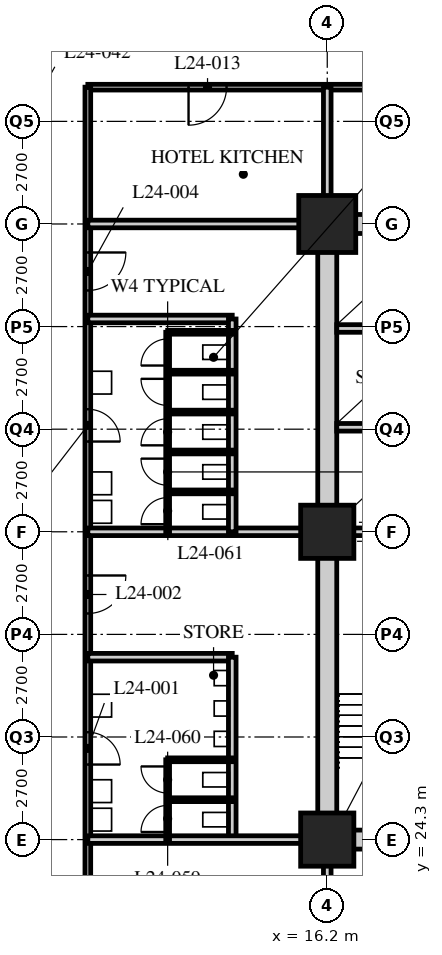
"""IFC4 building model, lengths in metres.
Left out: names, types, materials, properties, quantities, classifications, styles, units other than length and angle.
Written with IfcOpenShell. Run it as: python <this file> out.ifc"""

import sys

from ifc_helpers import new_model, si_unit, direction, frame, frame_2d, origin, origin_2d, place, context, subcontext, project, spatial, rectangle, hollow_rectangle, extrude, element, fill, save


model = new_model("IFC4")
c1 = context("Model", 3, precision=1e-05, world=origin(), true_north=direction((0.0, 1.0)))
c2 = subcontext(c1, "Body", "Model", "MODEL_VIEW")
j1 = project(units=[si_unit("LENGTHUNIT", "METRE"), si_unit("PLANEANGLEUNIT", "RADIAN")], contexts=[c1])
p1 = place(None, origin())
s1 = spatial("IfcSite", under=j1, at=p1, CompositionType="ELEMENT")
p2 = place(p1, origin())
s2 = spatial("IfcBuilding", under=s1, at=p2, CompositionType="ELEMENT")
p3 = place(p2, frame((0.0, 0.0, 98.0)))
s3 = spatial("IfcBuildingStorey", under=s2, at=p3, CompositionType="ELEMENT", Elevation=98.0)
for number, where, z_axis, x_axis in (
    (1, (16.2, 24.3, 0.0), (0.0, 0.0, 1.0), (1.0, 0.0, 0.0)),
    (2, (16.2, 32.4, 0.0), (0.0, 0.0, 1.0), (1.0, 0.0, 0.0)),
):
    element("IfcColumn", number, at=place(p3, frame(where, z_axis=z_axis, x_axis=x_axis)), inside=s3, PredefinedType="COLUMN", context=c2, shape_type="SweptSolid", body=[
        extrude(hollow_rectangle(XDim=1.4, YDim=1.4, WallThickness=0.12, at=origin_2d()), origin(), (0.0, 0.0, 1.0), 5.4),
    ])
p4 = place(p3, frame((16.2, 40.5, 0.0), z_axis=(0.0, 0.0, 1.0), x_axis=(1.0, 0.0, 0.0)))
e3 = element("IfcColumn", 3, at=p4, inside=s3, PredefinedType="COLUMN", context=c2, shape_type="SweptSolid", body=[
    extrude(hollow_rectangle(XDim=1.5, YDim=1.5, WallThickness=0.13, at=origin_2d()), origin(), (0.0, 0.0, 1.0), 5.4),
])
p5 = place(p3, frame((27.14, 44.1, 0.0), z_axis=(0.0, 0.0, 1.0), x_axis=(-1.0, 0.0, 0.0)))
e4 = element("IfcWall", 4, at=p5, inside=s3, PredefinedType="PARTITIONING", context=c2, shape_type="SweptSolid", body=[
    extrude(rectangle(XDim=17.24, YDim=0.15, at=frame_2d((8.62, 0.0))), origin(), (0.0, 0.0, 1.0), 5.19),
])
p6 = place(p5, frame((13.59, 0.0, 0.0)))
e5 = element("IfcOpeningElement", 5, at=p6, cuts=e4, PredefinedType="OPENING", context=c2, shape_type="SweptSolid", body=[
    extrude(rectangle(XDim=1.0, YDim=2.1, at=frame_2d((0.5, 1.05))), frame((0.0, 0.085, 0.0), z_axis=(0.0, -1.0, 0.0), x_axis=(1.0, 0.0, 0.0)), (0.0, 0.0, 1.0), 0.17),
])
p7 = place(p5, frame((4.965, 0.0, 0.0)))
e6 = element("IfcOpeningElement", 6, at=p7, cuts=e4, PredefinedType="OPENING", context=c2, shape_type="SweptSolid", body=[
    extrude(rectangle(XDim=1.0, YDim=2.1, at=frame_2d((0.5, 1.05))), frame((0.0, 0.085, 0.0), z_axis=(0.0, -1.0, 0.0), x_axis=(1.0, 0.0, 0.0)), (0.0, 0.0, 1.0), 0.17),
])
p8 = place(p3, frame((9.9, 44.1, 0.0), z_axis=(0.0, 0.0, 1.0), x_axis=(0.0, -1.0, 0.0)))
e7 = element("IfcWall", 7, at=p8, inside=s3, PredefinedType="PARTITIONING", context=c2, shape_type="SweptSolid", body=[
    extrude(rectangle(XDim=28.8, YDim=0.15, at=frame_2d((14.4, 0.0))), origin(), (0.0, 0.0, 1.0), 5.19),
])
p9 = place(p8, frame((16.975, 0.0, 0.0)))
e8 = element("IfcOpeningElement", 8, at=p9, cuts=e7, PredefinedType="OPENING", context=c2, shape_type="SweptSolid", body=[
    extrude(rectangle(XDim=0.85, YDim=2.1, at=frame_2d((0.425, 1.05))), frame((0.0, 0.085, 0.0), z_axis=(0.0, -1.0, 0.0), x_axis=(1.0, 0.0, 0.0)), (0.0, 0.0, 1.0), 0.17),
])
p10 = place(p8, frame((12.85, 0.0, 0.0)))
e9 = element("IfcOpeningElement", 9, at=p10, cuts=e7, PredefinedType="OPENING", context=c2, shape_type="SweptSolid", body=[
    extrude(rectangle(XDim=1.0, YDim=2.1, at=frame_2d((0.5, 1.05))), frame((0.0, 0.085, 0.0), z_axis=(0.0, -1.0, 0.0), x_axis=(1.0, 0.0, 0.0)), (0.0, 0.0, 1.0), 0.17),
])
p11 = place(p8, frame((8.475, 0.0, 0.0)))
e10 = element("IfcOpeningElement", 10, at=p11, cuts=e7, PredefinedType="OPENING", context=c2, shape_type="SweptSolid", body=[
    extrude(rectangle(XDim=0.85, YDim=2.1, at=frame_2d((0.425, 1.05))), frame((0.0, 0.085, 0.0), z_axis=(0.0, -1.0, 0.0), x_axis=(1.0, 0.0, 0.0)), (0.0, 0.0, 1.0), 0.17),
])
p12 = place(p8, frame((4.35, 0.0, 0.0)))
e11 = element("IfcOpeningElement", 11, at=p12, cuts=e7, PredefinedType="OPENING", context=c2, shape_type="SweptSolid", body=[
    extrude(rectangle(XDim=1.0, YDim=2.1, at=frame_2d((0.5, 1.05))), frame((0.0, 0.085, 0.0), z_axis=(0.0, -1.0, 0.0), x_axis=(1.0, 0.0, 0.0)), (0.0, 0.0, 1.0), 0.17),
])
p13 = place(p3, frame((9.9, 32.4, 0.0), z_axis=(0.0, 0.0, 1.0), x_axis=(1.0, 0.0, 0.0)))
e12 = element("IfcWall", 12, at=p13, inside=s3, PredefinedType="SOLIDWALL", context=c2, shape_type="SweptSolid", body=[
    extrude(rectangle(XDim=6.3, YDim=0.2, at=frame_2d((3.15, 0.0))), origin(), (0.0, 0.0, 1.0), 5.19),
])
p14 = place(p3, frame((9.9, 29.1, 0.0), z_axis=(0.0, 0.0, 1.0), x_axis=(1.0, 0.0, 0.0)))
e13 = element("IfcWall", 13, at=p14, inside=s3, PredefinedType="SOLIDWALL", context=c2, shape_type="SweptSolid", body=[
    extrude(rectangle(XDim=3.8, YDim=0.2, at=frame_2d((1.9, 0.0))), origin(), (0.0, 0.0, 1.0), 5.19),
])
p15 = place(p3, frame((13.7, 24.3, 0.0), z_axis=(0.0, 0.0, 1.0), x_axis=(0.0, 1.0, 0.0)))
e14 = element("IfcWall", 14, at=p15, inside=s3, PredefinedType="SOLIDWALL", context=c2, shape_type="SweptSolid", body=[
    extrude(rectangle(XDim=4.8, YDim=0.2, at=frame_2d((2.4, 0.0))), origin(), (0.0, 0.0, 1.0), 5.19),
])
p16 = place(p3, frame((9.9, 38.0, 0.0), z_axis=(0.0, 0.0, 1.0), x_axis=(1.0, 0.0, 0.0)))
e15 = element("IfcWall", 15, at=p16, inside=s3, PredefinedType="SOLIDWALL", context=c2, shape_type="SweptSolid", body=[
    extrude(rectangle(XDim=3.8, YDim=0.2, at=frame_2d((1.9, 0.0))), origin(), (0.0, 0.0, 1.0), 4.49),
])
p17 = place(p3, frame((13.7, 32.4, 0.0), z_axis=(0.0, 0.0, 1.0), x_axis=(0.0, 1.0, 0.0)))
e16 = element("IfcWall", 16, at=p17, inside=s3, PredefinedType="SOLIDWALL", context=c2, shape_type="SweptSolid", body=[
    extrude(rectangle(XDim=5.6, YDim=0.2, at=frame_2d((2.8, 0.0))), origin(), (0.0, 0.0, 1.0), 5.19),
])
p18 = place(p3, frame((16.2, 15.3, 0.0), z_axis=(0.0, 0.0, 1.0), x_axis=(0.0, 1.0, 0.0)))
e17 = element("IfcWall", 17, at=p18, inside=s3, PredefinedType="SOLIDWALL", context=c2, shape_type="SweptSolid", body=[
    extrude(rectangle(XDim=9.0, YDim=0.2, at=frame_2d((4.5, 0.0))), origin(), (0.0, 0.0, 1.0), 4.49),
])
p19 = place(p3, frame((16.2, 40.5, 0.0), z_axis=(0.0, 0.0, 1.0), x_axis=(0.0, 1.0, 0.0)))
e18 = element("IfcWall", 18, at=p19, inside=s3, PredefinedType="SOLIDWALL", context=c2, shape_type="SweptSolid", body=[
    extrude(rectangle(XDim=3.6, YDim=0.2, at=frame_2d((1.8, 0.0))), origin(), (0.0, 0.0, 1.0), 4.49),
])
for number, where, z_axis, x_axis in (
    (19, (9.9, 24.3, 0.0), (0.0, 0.0, 1.0), (1.0, 0.0, 0.0)),
    (20, (9.9, 40.5, 0.0), (0.0, 0.0, 1.0), (1.0, 0.0, 0.0)),
):
    element("IfcWall", number, at=place(p3, frame(where, z_axis=z_axis, x_axis=x_axis)), inside=s3, PredefinedType="SOLIDWALL", context=c2, shape_type="SweptSolid", body=[
        extrude(rectangle(XDim=6.3, YDim=0.2, at=frame_2d((3.15, 0.0))), origin(), (0.0, 0.0, 1.0), 5.19),
    ])
p20 = place(p3, frame((12.0, 24.3, 0.0), z_axis=(0.0, 0.0, 1.0), x_axis=(0.0, 1.0, 0.0)))
e21 = element("IfcWall", 21, at=p20, inside=s3, PredefinedType="PARTITIONING", context=c2, shape_type="SweptSolid", body=[
    extrude(rectangle(XDim=2.1, YDim=0.1, at=frame_2d((1.05, 0.0))), origin(), (0.0, 0.0, 1.0), 5.19),
])
p21 = place(p20, frame((0.2, 0.0, 0.0)))
e22 = element("IfcOpeningElement", 22, at=p21, cuts=e21, PredefinedType="OPENING", context=c2, shape_type="SweptSolid", body=[
    extrude(rectangle(XDim=0.7, YDim=2.0, at=frame_2d((0.35, 1.0))), frame((0.0, 0.06, 0.0), z_axis=(0.0, -1.0, 0.0), x_axis=(1.0, 0.0, 0.0)), (0.0, 0.0, 1.0), 0.12),
])
p22 = place(p20, frame((1.225, 0.0, 0.0)))
e23 = element("IfcOpeningElement", 23, at=p22, cuts=e21, PredefinedType="OPENING", context=c2, shape_type="SweptSolid", body=[
    extrude(rectangle(XDim=0.7, YDim=2.0, at=frame_2d((0.35, 1.0))), frame((0.0, 0.06, 0.0), z_axis=(0.0, -1.0, 0.0), x_axis=(1.0, 0.0, 0.0)), (0.0, 0.0, 1.0), 0.12),
])
for number, where, z_axis, x_axis in (
    (24, (12.0, 25.35, 0.0), (0.0, 0.0, 1.0), (1.0, 0.0, 0.0)),
    (25, (12.0, 26.4, 0.0), (0.0, 0.0, 1.0), (1.0, 0.0, 0.0)),
):
    element("IfcWall", number, at=place(p3, frame(where, z_axis=z_axis, x_axis=x_axis)), inside=s3, PredefinedType="PARTITIONING", context=c2, shape_type="SweptSolid", body=[
        extrude(rectangle(XDim=1.7, YDim=0.1, at=frame_2d((0.85, 0.0))), origin(), (0.0, 0.0, 1.0), 5.19),
    ])
p23 = place(p3, frame((12.0, 32.4, 0.0), z_axis=(0.0, 0.0, 1.0), x_axis=(0.0, 1.0, 0.0)))
e26 = element("IfcWall", 26, at=p23, inside=s3, PredefinedType="PARTITIONING", context=c2, shape_type="SweptSolid", body=[
    extrude(rectangle(XDim=5.25, YDim=0.1, at=frame_2d((2.625, 0.0))), origin(), (0.0, 0.0, 1.0), 5.19),
])
p24 = place(p23, frame((0.2, 0.0, 0.0)))
e27 = element("IfcOpeningElement", 27, at=p24, cuts=e26, PredefinedType="OPENING", context=c2, shape_type="SweptSolid", body=[
    extrude(rectangle(XDim=0.7, YDim=2.0, at=frame_2d((0.35, 1.0))), frame((0.0, 0.06, 0.0), z_axis=(0.0, -1.0, 0.0), x_axis=(1.0, 0.0, 0.0)), (0.0, 0.0, 1.0), 0.12),
])
p25 = place(p23, frame((1.225, 0.0, 0.0)))
e28 = element("IfcOpeningElement", 28, at=p25, cuts=e26, PredefinedType="OPENING", context=c2, shape_type="SweptSolid", body=[
    extrude(rectangle(XDim=0.7, YDim=2.0, at=frame_2d((0.35, 1.0))), frame((0.0, 0.06, 0.0), z_axis=(0.0, -1.0, 0.0), x_axis=(1.0, 0.0, 0.0)), (0.0, 0.0, 1.0), 0.12),
])
p26 = place(p23, frame((2.275, 0.0, 0.0)))
e29 = element("IfcOpeningElement", 29, at=p26, cuts=e26, PredefinedType="OPENING", context=c2, shape_type="SweptSolid", body=[
    extrude(rectangle(XDim=0.7, YDim=2.0, at=frame_2d((0.35, 1.0))), frame((0.0, 0.06, 0.0), z_axis=(0.0, -1.0, 0.0), x_axis=(1.0, 0.0, 0.0)), (0.0, 0.0, 1.0), 0.12),
])
p27 = place(p23, frame((3.325, 0.0, 0.0)))
e30 = element("IfcOpeningElement", 30, at=p27, cuts=e26, PredefinedType="OPENING", context=c2, shape_type="SweptSolid", body=[
    extrude(rectangle(XDim=0.7, YDim=2.0, at=frame_2d((0.35, 1.0))), frame((0.0, 0.06, 0.0), z_axis=(0.0, -1.0, 0.0), x_axis=(1.0, 0.0, 0.0)), (0.0, 0.0, 1.0), 0.12),
])
p28 = place(p23, frame((4.375, 0.0, 0.0)))
e31 = element("IfcOpeningElement", 31, at=p28, cuts=e26, PredefinedType="OPENING", context=c2, shape_type="SweptSolid", body=[
    extrude(rectangle(XDim=0.7, YDim=2.0, at=frame_2d((0.35, 1.0))), frame((0.0, 0.06, 0.0), z_axis=(0.0, -1.0, 0.0), x_axis=(1.0, 0.0, 0.0)), (0.0, 0.0, 1.0), 0.12),
])
for number, where, z_axis, x_axis in (
    (32, (12.0, 33.45, 0.0), (0.0, 0.0, 1.0), (1.0, 0.0, 0.0)),
    (33, (12.0, 34.5, 0.0), (0.0, 0.0, 1.0), (1.0, 0.0, 0.0)),
    (34, (12.0, 35.55, 0.0), (0.0, 0.0, 1.0), (1.0, 0.0, 0.0)),
    (35, (12.0, 36.6, 0.0), (0.0, 0.0, 1.0), (1.0, 0.0, 0.0)),
):
    element("IfcWall", number, at=place(p3, frame(where, z_axis=z_axis, x_axis=x_axis)), inside=s3, PredefinedType="PARTITIONING", context=c2, shape_type="SweptSolid", body=[
        extrude(rectangle(XDim=1.7, YDim=0.1, at=frame_2d((0.85, 0.0))), origin(), (0.0, 0.0, 1.0), 5.19),
    ])
p29 = place(p3, frame((12.0, 37.65, 0.0), z_axis=(0.0, 0.0, 1.0), x_axis=(1.0, 0.0, 0.0)))
e36 = element("IfcWall", 36, at=p29, inside=s3, PredefinedType="PARTITIONING", context=c2, shape_type="SweptSolid", body=[
    extrude(rectangle(XDim=1.7, YDim=0.1, at=frame_2d((0.85, 0.0))), origin(), (0.0, 0.0, 1.0), 4.49),
])
p30 = place(p3, frame((15.95, 24.3, 0.0), z_axis=(0.0, 0.0, 1.0), x_axis=(1.0, 0.0, 0.0)))
e37 = element("IfcWall", 37, at=p30, inside=s3, PredefinedType="SOLIDWALL", context=c2, shape_type="SweptSolid", body=[
    extrude(rectangle(XDim=24.8, YDim=0.5, at=frame_2d((12.4, 0.0))), origin(), (0.0, 0.0, 1.0), 4.49),
])
p31 = place(p30, frame((11.5, 0.0, 0.0)))
e38 = element("IfcOpeningElement", 38, at=p31, cuts=e37, PredefinedType="OPENING", context=c2, shape_type="SweptSolid", body=[
    extrude(rectangle(XDim=1.8, YDim=2.4, at=frame_2d((0.9, 1.2))), frame((0.0, 0.26, 0.0), z_axis=(0.0, -1.0, 0.0), x_axis=(1.0, 0.0, 0.0)), (0.0, 0.0, 1.0), 0.52),
])
p32 = place(p3, frame((15.95, 40.5, 0.0), z_axis=(0.0, 0.0, 1.0), x_axis=(1.0, 0.0, 0.0)))
e39 = element("IfcWall", 39, at=p32, inside=s3, PredefinedType="SOLIDWALL", context=c2, shape_type="SweptSolid", body=[
    extrude(rectangle(XDim=24.8, YDim=0.5, at=frame_2d((12.4, 0.0))), origin(), (0.0, 0.0, 1.0), 4.49),
])
p33 = place(p32, frame((11.5, 0.0, 0.0)))
e40 = element("IfcOpeningElement", 40, at=p33, cuts=e39, PredefinedType="OPENING", context=c2, shape_type="SweptSolid", body=[
    extrude(rectangle(XDim=1.8, YDim=2.4, at=frame_2d((0.9, 1.2))), frame((0.0, 0.26, 0.0), z_axis=(0.0, -1.0, 0.0), x_axis=(1.0, 0.0, 0.0)), (0.0, 0.0, 1.0), 0.52),
])
p34 = place(p3, frame((16.2, 24.55, 0.0), z_axis=(0.0, 0.0, 1.0), x_axis=(0.0, 1.0, 0.0)))
e41 = element("IfcWall", 41, at=p34, inside=s3, PredefinedType="SOLIDWALL", context=c2, shape_type="SweptSolid", body=[
    extrude(rectangle(XDim=15.7, YDim=0.5, at=frame_2d((7.85, 0.0))), origin(), (0.0, 0.0, 1.0), 4.49),
])
p35 = place(p3, frame((16.45, 32.4, 0.0), z_axis=(0.0, 0.0, 1.0), x_axis=(1.0, 0.0, 0.0)))
e42 = element("IfcWall", 42, at=p35, inside=s3, PredefinedType="SOLIDWALL", context=c2, shape_type="SweptSolid", body=[
    extrude(rectangle(XDim=7.95, YDim=0.2, at=frame_2d((3.975, 0.0))), origin(), (0.0, 0.0, 1.0), 4.578),
])
for number, where, z_axis, x_axis in (
    (43, (16.45, 35.15, 0.0), (0.0, 0.0, 1.0), (1.0, 0.0, 0.0)),
    (44, (16.45, 37.75, 0.0), (0.0, 0.0, 1.0), (1.0, 0.0, 0.0)),
):
    element("IfcWall", number, at=place(p3, frame(where, z_axis=z_axis, x_axis=x_axis)), inside=s3, PredefinedType="SOLIDWALL", context=c2, shape_type="SweptSolid", body=[
        extrude(rectangle(XDim=2.6, YDim=0.2, at=frame_2d((1.3, 0.0))), origin(), (0.0, 0.0, 1.0), 5.19),
    ])
p36 = place(p9, origin())
e45 = element("IfcDoor", 45, at=p36, inside=s3, OperationType="SINGLE_SWING_RIGHT", PredefinedType="DOOR", context=c2, shape_type="SweptSolid", body=[
    extrude(rectangle(XDim=0.85, YDim=2.1, at=frame_2d((0.425, 1.05))), frame((0.0, 0.025, 0.0), z_axis=(0.0, -1.0, 0.0), x_axis=(1.0, 0.0, 0.0)), (0.0, 0.0, 1.0), 0.05),
])
fill(e8, e45)
p37 = place(p10, origin())
e46 = element("IfcDoor", 46, at=p37, inside=s3, OperationType="SINGLE_SWING_LEFT", PredefinedType="DOOR", context=c2, shape_type="SweptSolid", body=[
    extrude(rectangle(XDim=1.0, YDim=2.1, at=frame_2d((0.5, 1.05))), frame((0.0, 0.025, 0.0), z_axis=(0.0, -1.0, 0.0), x_axis=(1.0, 0.0, 0.0)), (0.0, 0.0, 1.0), 0.05),
])
fill(e9, e46)
p38 = place(p11, origin())
e47 = element("IfcDoor", 47, at=p38, inside=s3, OperationType="SINGLE_SWING_RIGHT", PredefinedType="DOOR", context=c2, shape_type="SweptSolid", body=[
    extrude(rectangle(XDim=0.85, YDim=2.1, at=frame_2d((0.425, 1.05))), frame((0.0, 0.025, 0.0), z_axis=(0.0, -1.0, 0.0), x_axis=(1.0, 0.0, 0.0)), (0.0, 0.0, 1.0), 0.05),
])
fill(e10, e47)
p39 = place(p12, origin())
e48 = element("IfcDoor", 48, at=p39, inside=s3, OperationType="SINGLE_SWING_LEFT", PredefinedType="DOOR", context=c2, shape_type="SweptSolid", body=[
    extrude(rectangle(XDim=1.0, YDim=2.1, at=frame_2d((0.5, 1.05))), frame((0.0, 0.025, 0.0), z_axis=(0.0, -1.0, 0.0), x_axis=(1.0, 0.0, 0.0)), (0.0, 0.0, 1.0), 0.05),
])
fill(e11, e48)
p40 = place(p6, origin())
e49 = element("IfcDoor", 49, at=p40, inside=s3, OperationType="SINGLE_SWING_RIGHT", PredefinedType="DOOR", context=c2, shape_type="SweptSolid", body=[
    extrude(rectangle(XDim=1.0, YDim=2.1, at=frame_2d((0.5, 1.05))), frame((0.0, 0.025, 0.0), z_axis=(0.0, -1.0, 0.0), x_axis=(1.0, 0.0, 0.0)), (0.0, 0.0, 1.0), 0.05),
])
fill(e5, e49)
p41 = place(p21, origin())
e50 = element("IfcDoor", 50, at=p41, inside=s3, OperationType="SINGLE_SWING_LEFT", PredefinedType="DOOR", context=c2, shape_type="SweptSolid", body=[
    extrude(rectangle(XDim=0.7, YDim=2.0, at=frame_2d((0.35, 1.0))), frame((0.0, 0.025, 0.0), z_axis=(0.0, -1.0, 0.0), x_axis=(1.0, 0.0, 0.0)), (0.0, 0.0, 1.0), 0.05),
])
fill(e22, e50)
p42 = place(p22, origin())
e51 = element("IfcDoor", 51, at=p42, inside=s3, OperationType="SINGLE_SWING_RIGHT", PredefinedType="DOOR", context=c2, shape_type="SweptSolid", body=[
    extrude(rectangle(XDim=0.7, YDim=2.0, at=frame_2d((0.35, 1.0))), frame((0.0, 0.025, 0.0), z_axis=(0.0, -1.0, 0.0), x_axis=(1.0, 0.0, 0.0)), (0.0, 0.0, 1.0), 0.05),
])
fill(e23, e51)
p43 = place(p24, origin())
e52 = element("IfcDoor", 52, at=p43, inside=s3, OperationType="SINGLE_SWING_LEFT", PredefinedType="DOOR", context=c2, shape_type="SweptSolid", body=[
    extrude(rectangle(XDim=0.7, YDim=2.0, at=frame_2d((0.35, 1.0))), frame((0.0, 0.025, 0.0), z_axis=(0.0, -1.0, 0.0), x_axis=(1.0, 0.0, 0.0)), (0.0, 0.0, 1.0), 0.05),
])
fill(e27, e52)
p44 = place(p25, origin())
e53 = element("IfcDoor", 53, at=p44, inside=s3, OperationType="SINGLE_SWING_RIGHT", PredefinedType="DOOR", context=c2, shape_type="SweptSolid", body=[
    extrude(rectangle(XDim=0.7, YDim=2.0, at=frame_2d((0.35, 1.0))), frame((0.0, 0.025, 0.0), z_axis=(0.0, -1.0, 0.0), x_axis=(1.0, 0.0, 0.0)), (0.0, 0.0, 1.0), 0.05),
])
fill(e28, e53)
p45 = place(p26, origin())
e54 = element("IfcDoor", 54, at=p45, inside=s3, OperationType="SINGLE_SWING_LEFT", PredefinedType="DOOR", context=c2, shape_type="SweptSolid", body=[
    extrude(rectangle(XDim=0.7, YDim=2.0, at=frame_2d((0.35, 1.0))), frame((0.0, 0.025, 0.0), z_axis=(0.0, -1.0, 0.0), x_axis=(1.0, 0.0, 0.0)), (0.0, 0.0, 1.0), 0.05),
])
fill(e29, e54)
p46 = place(p27, origin())
e55 = element("IfcDoor", 55, at=p46, inside=s3, OperationType="SINGLE_SWING_RIGHT", PredefinedType="DOOR", context=c2, shape_type="SweptSolid", body=[
    extrude(rectangle(XDim=0.7, YDim=2.0, at=frame_2d((0.35, 1.0))), frame((0.0, 0.025, 0.0), z_axis=(0.0, -1.0, 0.0), x_axis=(1.0, 0.0, 0.0)), (0.0, 0.0, 1.0), 0.05),
])
fill(e30, e55)
p47 = place(p28, origin())
e56 = element("IfcDoor", 56, at=p47, inside=s3, OperationType="SINGLE_SWING_LEFT", PredefinedType="DOOR", context=c2, shape_type="SweptSolid", body=[
    extrude(rectangle(XDim=0.7, YDim=2.0, at=frame_2d((0.35, 1.0))), frame((0.0, 0.025, 0.0), z_axis=(0.0, -1.0, 0.0), x_axis=(1.0, 0.0, 0.0)), (0.0, 0.0, 1.0), 0.05),
])
fill(e31, e56)
save(model, sys.argv[1])
